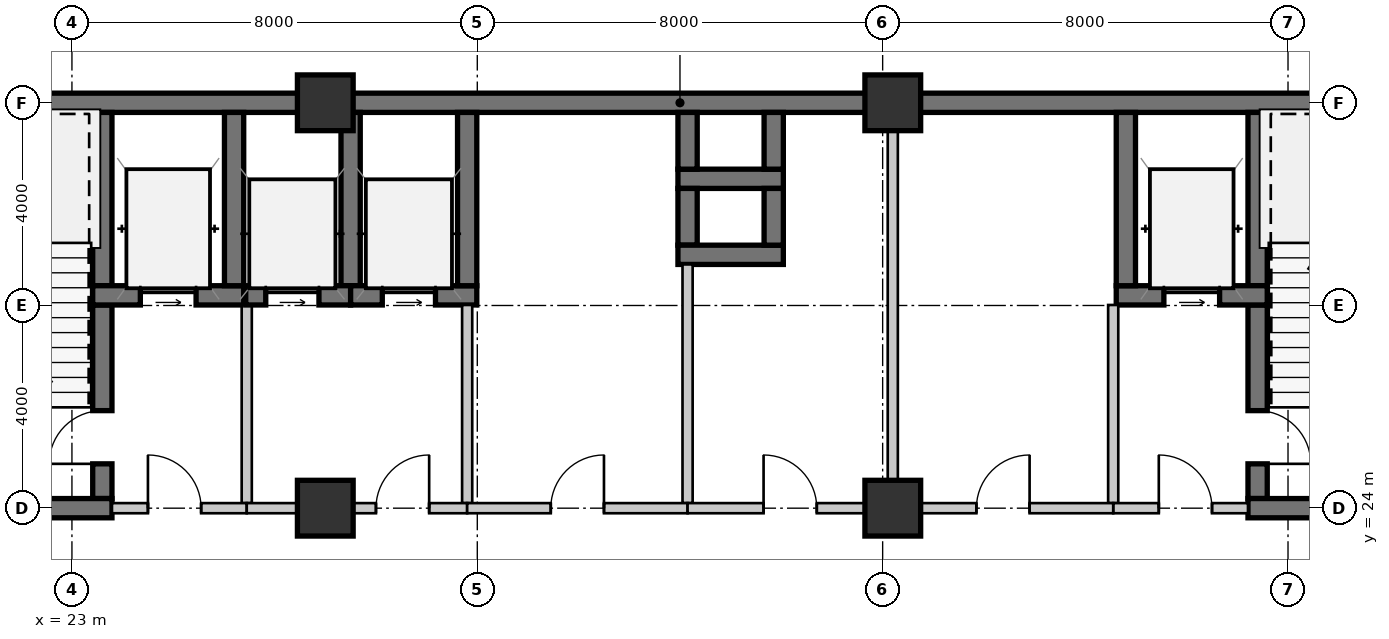
"""IFC4 building model, lengths in metres.
Left out: names, types, materials, properties, quantities, classifications, styles, units other than length and angle.
Written with IfcOpenShell. Run it as: python <this file> out.ifc"""

import sys

from ifc_helpers import new_model, si_unit, direction, frame, frame_2d, origin, origin_2d, place, context, subcontext, project, spatial, rectangle, extrude, source, transform, mapped, element, fill, save


model = new_model("IFC4")
c1 = context("Model", 3, precision=1e-05, world=origin(), true_north=direction((0.0, 1.0)))
c2 = subcontext(c1, "Body", "Model", "MODEL_VIEW")
j1 = project(units=[si_unit("LENGTHUNIT", "METRE"), si_unit("PLANEANGLEUNIT", "RADIAN")], contexts=[c1])
p1 = place(None, origin())
s1 = spatial("IfcSite", under=j1, at=p1, CompositionType="ELEMENT")
p2 = place(p1, origin())
s2 = spatial("IfcBuilding", under=s1, at=p2, CompositionType="ELEMENT")
p3 = place(p2, frame((0.0, 0.0, -8.0)))
s3 = spatial("IfcBuildingStorey", under=s2, at=p3, CompositionType="ELEMENT", Elevation=-8.0)
m1 = source(origin(), c2, "Body", "SweptSolid", [
    extrude(rectangle(XDim=1.1, YDim=1.1, at=origin_2d()), origin(), (0.0, 0.0, 1.0), 4.0),
])
for number, where, z_axis, x_axis in (
    (1, (28.0, 24.0, 0.0), (0.0, 0.0, 1.0), (1.0, 0.0, 0.0)),
    (2, (39.2, 24.0, 0.0), (0.0, 0.0, 1.0), (1.0, 0.0, 0.0)),
    (3, (28.0, 32.0, 0.0), (0.0, 0.0, 1.0), (1.0, 0.0, 0.0)),
    (4, (39.2, 32.0, 0.0), (0.0, 0.0, 1.0), (1.0, 0.0, 0.0)),
):
    element("IfcColumn", number, at=place(p3, frame(where, z_axis=z_axis, x_axis=x_axis)), inside=s3, PredefinedType="COLUMN", context=c2, shape_type="MappedRepresentation", body=[
        mapped(m1, transform((0.0, 0.0, 0.0), scale=1.0)),
    ])
m2 = source(origin(), c2, "Body", "SweptSolid", [
    extrude(rectangle(XDim=9.19, YDim=0.38, at=frame_2d((4.595, 0.0))), origin(), (0.0, 0.0, 1.0), 3.72),
])
p4 = place(p3, frame((18.81, 32.0, 0.0), z_axis=(0.0, 0.0, 1.0), x_axis=(1.0, 0.0, 0.0)))
e5 = element("IfcWall", 5, at=p4, inside=s3, PredefinedType="SHEAR", context=c2, shape_type="MappedRepresentation", body=[
    mapped(m2, transform((0.0, 0.0, 0.0), scale=1.0)),
])
m3 = source(origin(), c2, "Body", "SweptSolid", [
    extrude(rectangle(XDim=11.2, YDim=0.38, at=frame_2d((5.6, 0.0))), origin(), (0.0, 0.0, 1.0), 3.72),
])
p5 = place(p3, frame((28.0, 32.0, 0.0), z_axis=(0.0, 0.0, 1.0), x_axis=(1.0, 0.0, 0.0)))
e6 = element("IfcWall", 6, at=p5, inside=s3, PredefinedType="SHEAR", context=c2, shape_type="MappedRepresentation", body=[
    mapped(m3, transform((0.0, 0.0, 0.0), scale=1.0)),
])
m4 = source(origin(), c2, "Body", "SweptSolid", [
    extrude(rectangle(XDim=11.99, YDim=0.38, at=frame_2d((5.995, 0.0))), origin(), (0.0, 0.0, 1.0), 3.72),
])
p6 = place(p3, frame((39.2, 32.0, 0.0), z_axis=(0.0, 0.0, 1.0), x_axis=(1.0, 0.0, 0.0)))
e7 = element("IfcWall", 7, at=p6, inside=s3, PredefinedType="SHEAR", context=c2, shape_type="MappedRepresentation", body=[
    mapped(m4, transform((0.0, 0.0, 0.0), scale=1.0)),
])
m5 = source(origin(), c2, "Body", "SweptSolid", [
    extrude(rectangle(XDim=3.42, YDim=0.38, at=frame_2d((1.71, 0.0))), origin(), (0.0, 0.0, 1.0), 3.72),
])
p7 = place(p3, frame((23.6, 28.39, 0.0), z_axis=(0.0, 0.0, 1.0), x_axis=(0.0, 1.0, 0.0)))
e8 = element("IfcWall", 8, at=p7, inside=s3, PredefinedType="SHEAR", context=c2, shape_type="MappedRepresentation", body=[
    mapped(m5, transform((0.0, 0.0, 0.0), scale=1.0)),
])
m6 = source(origin(), c2, "Body", "SweptSolid", [
    extrude(rectangle(XDim=3.82, YDim=0.38, at=frame_2d((1.91, 0.0))), origin(), (0.0, 0.0, 1.0), 3.72),
])
p8 = place(p3, frame((23.6, 24.19, 0.0), z_axis=(0.0, 0.0, 1.0), x_axis=(0.0, 1.0, 0.0)))
e9 = element("IfcWall", 9, at=p8, inside=s3, PredefinedType="SHEAR", context=c2, shape_type="MappedRepresentation", body=[
    mapped(m6, transform((0.0, 0.0, 0.0), scale=1.0)),
])
m7 = source(origin(), c2, "Body", "SweptSolid", [
    extrude(rectangle(XDim=1.05, YDim=2.1, at=frame_2d((0.525, 1.05))), frame((0.0, 0.2, 0.0), z_axis=(0.0, -1.0, 0.0), x_axis=(1.0, 0.0, 0.0)), (0.0, 0.0, 1.0), 0.4),
])
p9 = place(p8, frame((0.685, 0.0, 0.0)))
e10 = element("IfcOpeningElement", 10, at=p9, cuts=e9, PredefinedType="OPENING", context=c2, shape_type="MappedRepresentation", body=[
    mapped(m7, transform((0.0, 0.0, 0.0), scale=1.0)),
])
m8 = source(origin(), c2, "Body", "SweptSolid", [
    extrude(rectangle(XDim=4.98, YDim=0.38, at=frame_2d((2.49, 0.0))), origin(), (0.0, 0.0, 1.0), 3.72),
])
p10 = place(p3, frame((18.81, 24.0, 0.0), z_axis=(0.0, 0.0, 1.0), x_axis=(1.0, 0.0, 0.0)))
e11 = element("IfcWall", 11, at=p10, inside=s3, PredefinedType="SHEAR", context=c2, shape_type="MappedRepresentation", body=[
    mapped(m8, transform((0.0, 0.0, 0.0), scale=1.0)),
])
m9 = source(origin(), c2, "Body", "SweptSolid", [
    extrude(rectangle(XDim=2.98, YDim=0.38, at=frame_2d((1.49, 0.0))), origin(), (0.0, 0.0, 1.0), 3.72),
])
p11 = place(p3, frame((23.41, 28.2, 0.0), z_axis=(0.0, 0.0, 1.0), x_axis=(1.0, 0.0, 0.0)))
e12 = element("IfcWall", 12, at=p11, inside=s3, PredefinedType="SHEAR", context=c2, shape_type="MappedRepresentation", body=[
    mapped(m9, transform((0.0, 0.0, 0.0), scale=1.0)),
])
m10 = source(origin(), c2, "Body", "SweptSolid", [
    extrude(rectangle(XDim=1.1, YDim=2.15, at=frame_2d((0.55, 1.075))), frame((0.0, 0.2, 0.0), z_axis=(0.0, -1.0, 0.0), x_axis=(1.0, 0.0, 0.0)), (0.0, 0.0, 1.0), 0.4),
])
p12 = place(p11, frame((0.94, 0.0, 0.0)))
e13 = element("IfcOpeningElement", 13, at=p12, cuts=e12, PredefinedType="OPENING", context=c2, shape_type="MappedRepresentation", body=[
    mapped(m10, transform((0.0, 0.0, 0.0), scale=1.0)),
])
p13 = place(p3, frame((26.2, 28.39, 0.0), z_axis=(0.0, 0.0, 1.0), x_axis=(0.0, 1.0, 0.0)))
e14 = element("IfcWall", 14, at=p13, inside=s3, PredefinedType="SHEAR", context=c2, shape_type="MappedRepresentation", body=[
    mapped(m5, transform((0.0, 0.0, 0.0), scale=1.0)),
])
m11 = source(origin(), c2, "Body", "SweptSolid", [
    extrude(rectangle(XDim=3.91, YDim=0.2, at=frame_2d((1.955, 0.0))), origin(), (0.0, 0.0, 1.0), 3.72),
])
p14 = place(p3, frame((26.45, 24.1, 0.0), z_axis=(0.0, 0.0, 1.0), x_axis=(0.0, 1.0, 0.0)))
e15 = element("IfcWall", 15, at=p14, inside=s3, PredefinedType="SOLIDWALL", context=c2, shape_type="MappedRepresentation", body=[
    mapped(m11, transform((0.0, 0.0, 0.0), scale=1.0)),
])
m12 = source(origin(), c2, "Body", "SweptSolid", [
    extrude(rectangle(XDim=2.66, YDim=0.2, at=frame_2d((1.33, 0.0))), origin(), (0.0, 0.0, 1.0), 3.26),
])
p15 = place(p3, frame((23.79, 24.0, 0.0), z_axis=(0.0, 0.0, 1.0), x_axis=(1.0, 0.0, 0.0)))
e16 = element("IfcWall", 16, at=p15, inside=s3, PredefinedType="SOLIDWALL", context=c2, shape_type="MappedRepresentation", body=[
    mapped(m12, transform((0.0, 0.0, 0.0), scale=1.0)),
])
m13 = source(origin(), c2, "Body", "SweptSolid", [
    extrude(rectangle(XDim=1.05, YDim=2.1, at=frame_2d((0.525, 1.05))), frame((0.0, 0.11, 0.0), z_axis=(0.0, -1.0, 0.0), x_axis=(1.0, 0.0, 0.0)), (0.0, 0.0, 1.0), 0.22),
])
p16 = place(p15, frame((0.71, 0.0, 0.0)))
e17 = element("IfcOpeningElement", 17, at=p16, cuts=e16, PredefinedType="OPENING", context=c2, shape_type="MappedRepresentation", body=[
    mapped(m13, transform((0.0, 0.0, 0.0), scale=1.0)),
])
p17 = place(p3, frame((46.4, 31.81, 0.0), z_axis=(0.0, 0.0, 1.0), x_axis=(0.0, -1.0, 0.0)))
e18 = element("IfcWall", 18, at=p17, inside=s3, PredefinedType="SHEAR", context=c2, shape_type="MappedRepresentation", body=[
    mapped(m5, transform((0.0, 0.0, 0.0), scale=1.0)),
])
p18 = place(p3, frame((46.4, 28.01, 0.0), z_axis=(0.0, 0.0, 1.0), x_axis=(0.0, -1.0, 0.0)))
e19 = element("IfcWall", 19, at=p18, inside=s3, PredefinedType="SHEAR", context=c2, shape_type="MappedRepresentation", body=[
    mapped(m6, transform((0.0, 0.0, 0.0), scale=1.0)),
])
p19 = place(p18, frame((2.085, 0.0, 0.0)))
e20 = element("IfcOpeningElement", 20, at=p19, cuts=e19, PredefinedType="OPENING", context=c2, shape_type="MappedRepresentation", body=[
    mapped(m7, transform((0.0, 0.0, 0.0), scale=1.0)),
])
p20 = place(p3, frame((46.21, 24.0, 0.0), z_axis=(0.0, 0.0, 1.0), x_axis=(1.0, 0.0, 0.0)))
e21 = element("IfcWall", 21, at=p20, inside=s3, PredefinedType="SHEAR", context=c2, shape_type="MappedRepresentation", body=[
    mapped(m8, transform((0.0, 0.0, 0.0), scale=1.0)),
])
p21 = place(p3, frame((43.61, 28.2, 0.0), z_axis=(0.0, 0.0, 1.0), x_axis=(1.0, 0.0, 0.0)))
e22 = element("IfcWall", 22, at=p21, inside=s3, PredefinedType="SHEAR", context=c2, shape_type="MappedRepresentation", body=[
    mapped(m9, transform((0.0, 0.0, 0.0), scale=1.0)),
])
p22 = place(p21, frame((0.94, 0.0, 0.0)))
e23 = element("IfcOpeningElement", 23, at=p22, cuts=e22, PredefinedType="OPENING", context=c2, shape_type="MappedRepresentation", body=[
    mapped(m10, transform((0.0, 0.0, 0.0), scale=1.0)),
])
p23 = place(p3, frame((43.8, 31.81, 0.0), z_axis=(0.0, 0.0, 1.0), x_axis=(0.0, -1.0, 0.0)))
e24 = element("IfcWall", 24, at=p23, inside=s3, PredefinedType="SHEAR", context=c2, shape_type="MappedRepresentation", body=[
    mapped(m5, transform((0.0, 0.0, 0.0), scale=1.0)),
])
p24 = place(p3, frame((43.55, 28.01, 0.0), z_axis=(0.0, 0.0, 1.0), x_axis=(0.0, -1.0, 0.0)))
e25 = element("IfcWall", 25, at=p24, inside=s3, PredefinedType="SOLIDWALL", context=c2, shape_type="MappedRepresentation", body=[
    mapped(m11, transform((0.0, 0.0, 0.0), scale=1.0)),
])
m14 = source(origin(), c2, "Body", "SweptSolid", [
    extrude(rectangle(XDim=2.66, YDim=0.2, at=frame_2d((1.33, 0.0))), origin(), (0.0, 0.0, 1.0), 3.187),
])
p25 = place(p3, frame((43.55, 24.0, 0.0), z_axis=(0.0, 0.0, 1.0), x_axis=(1.0, 0.0, 0.0)))
e26 = element("IfcWall", 26, at=p25, inside=s3, PredefinedType="SOLIDWALL", context=c2, shape_type="MappedRepresentation", body=[
    mapped(m14, transform((0.0, 0.0, 0.0), scale=1.0)),
])
p26 = place(p25, frame((0.9, 0.0, 0.0)))
e27 = element("IfcOpeningElement", 27, at=p26, cuts=e26, PredefinedType="OPENING", context=c2, shape_type="MappedRepresentation", body=[
    mapped(m13, transform((0.0, 0.0, 0.0), scale=1.0)),
])
m15 = source(origin(), c2, "Body", "SweptSolid", [
    extrude(rectangle(XDim=2.08, YDim=0.38, at=frame_2d((1.04, 0.0))), origin(), (0.0, 0.0, 1.0), 3.72),
])
p27 = place(p3, frame((34.96, 30.5, 0.0), z_axis=(0.0, 0.0, 1.0), x_axis=(1.0, 0.0, 0.0)))
e28 = element("IfcWall", 28, at=p27, inside=s3, PredefinedType="SHEAR", context=c2, shape_type="MappedRepresentation", body=[
    mapped(m15, transform((0.0, 0.0, 0.0), scale=1.0)),
])
m16 = source(origin(), c2, "Body", "SweptSolid", [
    extrude(rectangle(XDim=1.12, YDim=0.38, at=frame_2d((0.56, 0.0))), origin(), (0.0, 0.0, 1.0), 3.72),
])
for number, where, z_axis, x_axis in (
    (29, (35.15, 31.81, 0.0), (0.0, 0.0, 1.0), (0.0, -1.0, 0.0)),
    (30, (36.85, 30.69, 0.0), (0.0, 0.0, 1.0), (0.0, 1.0, 0.0)),
    (31, (35.15, 30.31, 0.0), (0.0, 0.0, 1.0), (0.0, -1.0, 0.0)),
):
    element("IfcWall", number, at=place(p3, frame(where, z_axis=z_axis, x_axis=x_axis)), inside=s3, PredefinedType="SHEAR", context=c2, shape_type="MappedRepresentation", body=[
        mapped(m16, transform((0.0, 0.0, 0.0), scale=1.0)),
    ])
p28 = place(p3, frame((34.96, 29.0, 0.0), z_axis=(0.0, 0.0, 1.0), x_axis=(1.0, 0.0, 0.0)))
e32 = element("IfcWall", 32, at=p28, inside=s3, PredefinedType="SHEAR", context=c2, shape_type="MappedRepresentation", body=[
    mapped(m15, transform((0.0, 0.0, 0.0), scale=1.0)),
])
p29 = place(p3, frame((36.85, 29.19, 0.0), z_axis=(0.0, 0.0, 1.0), x_axis=(0.0, 1.0, 0.0)))
e33 = element("IfcWall", 33, at=p29, inside=s3, PredefinedType="SHEAR", context=c2, shape_type="MappedRepresentation", body=[
    mapped(m16, transform((0.0, 0.0, 0.0), scale=1.0)),
])
p30 = place(p3, frame((28.5, 28.39, 0.0), z_axis=(0.0, 0.0, 1.0), x_axis=(0.0, 1.0, 0.0)))
e34 = element("IfcWall", 34, at=p30, inside=s3, PredefinedType="SHEAR", context=c2, shape_type="MappedRepresentation", body=[
    mapped(m5, transform((0.0, 0.0, 0.0), scale=1.0)),
])
m17 = source(origin(), c2, "Body", "SweptSolid", [
    extrude(rectangle(XDim=2.07, YDim=0.38, at=frame_2d((1.035, 0.0))), origin(), (0.0, 0.0, 1.0), 3.72),
])
p31 = place(p3, frame((26.43, 28.2, 0.0), z_axis=(0.0, 0.0, 1.0), x_axis=(1.0, 0.0, 0.0)))
e35 = element("IfcWall", 35, at=p31, inside=s3, PredefinedType="SHEAR", context=c2, shape_type="MappedRepresentation", body=[
    mapped(m17, transform((0.0, 0.0, 0.0), scale=1.0)),
])
m18 = source(origin(), c2, "Body", "SweptSolid", [
    extrude(rectangle(XDim=1.05, YDim=2.15, at=frame_2d((0.525, 1.075))), frame((0.0, 0.2, 0.0), z_axis=(0.0, -1.0, 0.0), x_axis=(1.0, 0.0, 0.0)), (0.0, 0.0, 1.0), 0.4),
])
p32 = place(p31, frame((0.395, 0.0, 0.0)))
e36 = element("IfcOpeningElement", 36, at=p32, cuts=e35, PredefinedType="OPENING", context=c2, shape_type="MappedRepresentation", body=[
    mapped(m18, transform((0.0, 0.0, 0.0), scale=1.0)),
])
m19 = source(origin(), c2, "Body", "SweptSolid", [
    extrude(rectangle(XDim=2.49, YDim=0.38, at=frame_2d((1.245, 0.0))), origin(), (0.0, 0.0, 1.0), 3.72),
])
p33 = place(p3, frame((28.5, 28.2, 0.0), z_axis=(0.0, 0.0, 1.0), x_axis=(1.0, 0.0, 0.0)))
e37 = element("IfcWall", 37, at=p33, inside=s3, PredefinedType="SHEAR", context=c2, shape_type="MappedRepresentation", body=[
    mapped(m19, transform((0.0, 0.0, 0.0), scale=1.0)),
])
p34 = place(p33, frame((0.625, 0.0, 0.0)))
e38 = element("IfcOpeningElement", 38, at=p34, cuts=e37, PredefinedType="OPENING", context=c2, shape_type="MappedRepresentation", body=[
    mapped(m18, transform((0.0, 0.0, 0.0), scale=1.0)),
])
p35 = place(p3, frame((30.8, 28.39, 0.0), z_axis=(0.0, 0.0, 1.0), x_axis=(0.0, 1.0, 0.0)))
e39 = element("IfcWall", 39, at=p35, inside=s3, PredefinedType="SHEAR", context=c2, shape_type="MappedRepresentation", body=[
    mapped(m5, transform((0.0, 0.0, 0.0), scale=1.0)),
])
p36 = place(p3, frame((30.8, 28.01, 0.0), z_axis=(0.0, 0.0, 1.0), x_axis=(0.0, -1.0, 0.0)))
e40 = element("IfcWall", 40, at=p36, inside=s3, PredefinedType="SOLIDWALL", context=c2, shape_type="MappedRepresentation", body=[
    mapped(m11, transform((0.0, 0.0, 0.0), scale=1.0)),
])
m20 = source(origin(), c2, "Body", "SweptSolid", [
    extrude(rectangle(XDim=4.35, YDim=0.2, at=frame_2d((2.175, 0.0))), origin(), (0.0, 0.0, 1.0), 3.26),
])
p37 = place(p3, frame((30.8, 24.0, 0.0), z_axis=(0.0, 0.0, 1.0), x_axis=(-1.0, 0.0, 0.0)))
e41 = element("IfcWall", 41, at=p37, inside=s3, PredefinedType="SOLIDWALL", context=c2, shape_type="MappedRepresentation", body=[
    mapped(m20, transform((0.0, 0.0, 0.0), scale=1.0)),
])
p38 = place(p37, frame((0.75, 0.0, 0.0)))
e42 = element("IfcOpeningElement", 42, at=p38, cuts=e41, PredefinedType="OPENING", context=c2, shape_type="MappedRepresentation", body=[
    mapped(m13, transform((0.0, 0.0, 0.0), scale=1.0)),
])
m21 = source(origin(), c2, "Body", "SweptSolid", [
    extrude(rectangle(XDim=4.71, YDim=0.2, at=frame_2d((2.355, 0.0))), origin(), (0.0, 0.0, 1.0), 3.72),
])
p39 = place(p3, frame((35.15, 28.81, 0.0), z_axis=(0.0, 0.0, 1.0), x_axis=(0.0, -1.0, 0.0)))
e43 = element("IfcWall", 43, at=p39, inside=s3, PredefinedType="SOLIDWALL", context=c2, shape_type="MappedRepresentation", body=[
    mapped(m21, transform((0.0, 0.0, 0.0), scale=1.0)),
])
m22 = source(origin(), c2, "Body", "SweptSolid", [
    extrude(rectangle(XDim=4.35, YDim=0.2, at=frame_2d((2.175, 0.0))), origin(), (0.0, 0.0, 1.0), 3.26),
])
p40 = place(p3, frame((35.15, 24.0, 0.0), z_axis=(0.0, 0.0, 1.0), x_axis=(-1.0, 0.0, 0.0)))
e44 = element("IfcWall", 44, at=p40, inside=s3, PredefinedType="SOLIDWALL", context=c2, shape_type="MappedRepresentation", body=[
    mapped(m22, transform((0.0, 0.0, 0.0), scale=1.0)),
])
p41 = place(p40, frame((1.65, 0.0, 0.0)))
e45 = element("IfcOpeningElement", 45, at=p41, cuts=e44, PredefinedType="OPENING", context=c2, shape_type="MappedRepresentation", body=[
    mapped(m13, transform((0.0, 0.0, 0.0), scale=1.0)),
])
m23 = source(origin(), c2, "Body", "SweptSolid", [
    extrude(rectangle(XDim=7.71, YDim=0.2, at=frame_2d((3.855, 0.0))), origin(), (0.0, 0.0, 1.0), 3.26),
])
p42 = place(p3, frame((39.2, 31.81, 0.0), z_axis=(0.0, 0.0, 1.0), x_axis=(0.0, -1.0, 0.0)))
e46 = element("IfcWall", 46, at=p42, inside=s3, PredefinedType="SOLIDWALL", context=c2, shape_type="MappedRepresentation", body=[
    mapped(m23, transform((0.0, 0.0, 0.0), scale=1.0)),
])
m24 = source(origin(), c2, "Body", "SweptSolid", [
    extrude(rectangle(XDim=4.05, YDim=0.2, at=frame_2d((2.025, 0.0))), origin(), (0.0, 0.0, 1.0), 3.26),
])
p43 = place(p3, frame((39.2, 24.0, 0.0), z_axis=(0.0, 0.0, 1.0), x_axis=(-1.0, 0.0, 0.0)))
e47 = element("IfcWall", 47, at=p43, inside=s3, PredefinedType="SOLIDWALL", context=c2, shape_type="MappedRepresentation", body=[
    mapped(m24, transform((0.0, 0.0, 0.0), scale=1.0)),
])
p44 = place(p43, frame((1.5, 0.0, 0.0)))
e48 = element("IfcOpeningElement", 48, at=p44, cuts=e47, PredefinedType="OPENING", context=c2, shape_type="MappedRepresentation", body=[
    mapped(m13, transform((0.0, 0.0, 0.0), scale=1.0)),
])
m25 = source(origin(), c2, "Body", "SweptSolid", [
    extrude(rectangle(XDim=4.35, YDim=0.2, at=frame_2d((2.175, 0.0))), origin(), (0.0, 0.0, 1.0), 3.187),
])
p45 = place(p3, frame((43.55, 24.0, 0.0), z_axis=(0.0, 0.0, 1.0), x_axis=(-1.0, 0.0, 0.0)))
e49 = element("IfcWall", 49, at=p45, inside=s3, PredefinedType="SOLIDWALL", context=c2, shape_type="MappedRepresentation", body=[
    mapped(m25, transform((0.0, 0.0, 0.0), scale=1.0)),
])
p46 = place(p45, frame((1.65, 0.0, 0.0)))
e50 = element("IfcOpeningElement", 50, at=p46, cuts=e49, PredefinedType="OPENING", context=c2, shape_type="MappedRepresentation", body=[
    mapped(m13, transform((0.0, 0.0, 0.0), scale=1.0)),
])
m26 = source(origin(), c2, "Body", "SweptSolid", [
    extrude(rectangle(XDim=1.05, YDim=2.1, at=frame_2d((0.525, 1.05))), frame((0.0, 0.025, 0.0), z_axis=(0.0, -1.0, 0.0), x_axis=(1.0, 0.0, 0.0)), (0.0, 0.0, 1.0), 0.05),
])
p47 = place(p9, origin())
e51 = element("IfcDoor", 51, at=p47, inside=s3, OperationType="SINGLE_SWING_LEFT", PredefinedType="DOOR", context=c2, shape_type="MappedRepresentation", body=[
    mapped(m26, transform((0.0, 0.0, 0.0), scale=1.0)),
])
fill(e10, e51)
m27 = source(origin(), c2, "Body", "SweptSolid", [
    extrude(rectangle(XDim=1.1, YDim=2.15, at=frame_2d((0.55, 1.075))), frame((0.0, 0.025, 0.0), z_axis=(0.0, -1.0, 0.0), x_axis=(1.0, 0.0, 0.0)), (0.0, 0.0, 1.0), 0.05),
])
p48 = place(p12, origin())
e52 = element("IfcDoor", 52, at=p48, inside=s3, OperationType="SLIDING_TO_LEFT", PredefinedType="DOOR", context=c2, shape_type="MappedRepresentation", body=[
    mapped(m27, transform((0.0, 0.0, 0.0), scale=1.0)),
])
fill(e13, e52)
p49 = place(p16, origin())
e53 = element("IfcDoor", 53, at=p49, inside=s3, OperationType="SINGLE_SWING_LEFT", PredefinedType="DOOR", context=c2, shape_type="MappedRepresentation", body=[
    mapped(m26, transform((0.0, 0.0, 0.0), scale=1.0)),
])
fill(e17, e53)
p50 = place(p19, origin())
e54 = element("IfcDoor", 54, at=p50, inside=s3, OperationType="SINGLE_SWING_RIGHT", PredefinedType="DOOR", context=c2, shape_type="MappedRepresentation", body=[
    mapped(m26, transform((0.0, 0.0, 0.0), scale=1.0)),
])
fill(e20, e54)
p51 = place(p22, origin())
e55 = element("IfcDoor", 55, at=p51, inside=s3, OperationType="SLIDING_TO_LEFT", PredefinedType="DOOR", context=c2, shape_type="MappedRepresentation", body=[
    mapped(m27, transform((0.0, 0.0, 0.0), scale=1.0)),
])
fill(e23, e55)
p52 = place(p26, origin())
e56 = element("IfcDoor", 56, at=p52, inside=s3, OperationType="SINGLE_SWING_LEFT", PredefinedType="DOOR", context=c2, shape_type="MappedRepresentation", body=[
    mapped(m26, transform((0.0, 0.0, 0.0), scale=1.0)),
])
fill(e27, e56)
m28 = source(origin(), c2, "Body", "SweptSolid", [
    extrude(rectangle(XDim=1.05, YDim=2.15, at=frame_2d((0.525, 1.075))), frame((0.0, 0.025, 0.0), z_axis=(0.0, -1.0, 0.0), x_axis=(1.0, 0.0, 0.0)), (0.0, 0.0, 1.0), 0.05),
])
p53 = place(p32, origin())
e57 = element("IfcDoor", 57, at=p53, inside=s3, OperationType="SLIDING_TO_LEFT", PredefinedType="DOOR", context=c2, shape_type="MappedRepresentation", body=[
    mapped(m28, transform((0.0, 0.0, 0.0), scale=1.0)),
])
fill(e36, e57)
p54 = place(p34, origin())
e58 = element("IfcDoor", 58, at=p54, inside=s3, OperationType="SLIDING_TO_LEFT", PredefinedType="DOOR", context=c2, shape_type="MappedRepresentation", body=[
    mapped(m28, transform((0.0, 0.0, 0.0), scale=1.0)),
])
fill(e38, e58)
p55 = place(p38, frame((1.05, 0.0, 0.0), z_axis=(0.0, 0.0, 1.0), x_axis=(-1.0, 0.0, 0.0)))
e59 = element("IfcDoor", 59, at=p55, inside=s3, OperationType="SINGLE_SWING_RIGHT", PredefinedType="DOOR", context=c2, shape_type="MappedRepresentation", body=[
    mapped(m26, transform((0.0, 0.0, 0.0), scale=1.0)),
])
fill(e42, e59)
p56 = place(p41, frame((1.05, 0.0, 0.0), z_axis=(0.0, 0.0, 1.0), x_axis=(-1.0, 0.0, 0.0)))
e60 = element("IfcDoor", 60, at=p56, inside=s3, OperationType="SINGLE_SWING_RIGHT", PredefinedType="DOOR", context=c2, shape_type="MappedRepresentation", body=[
    mapped(m26, transform((0.0, 0.0, 0.0), scale=1.0)),
])
fill(e45, e60)
p57 = place(p44, frame((1.05, 0.0, 0.0), z_axis=(0.0, 0.0, 1.0), x_axis=(-1.0, 0.0, 0.0)))
e61 = element("IfcDoor", 61, at=p57, inside=s3, OperationType="SINGLE_SWING_LEFT", PredefinedType="DOOR", context=c2, shape_type="MappedRepresentation", body=[
    mapped(m26, transform((0.0, 0.0, 0.0), scale=1.0)),
])
fill(e48, e61)
p58 = place(p46, frame((1.05, 0.0, 0.0), z_axis=(0.0, 0.0, 1.0), x_axis=(-1.0, 0.0, 0.0)))
e62 = element("IfcDoor", 62, at=p58, inside=s3, OperationType="SINGLE_SWING_RIGHT", PredefinedType="DOOR", context=c2, shape_type="MappedRepresentation", body=[
    mapped(m26, transform((0.0, 0.0, 0.0), scale=1.0)),
])
fill(e50, e62)
save(model, sys.argv[1])
